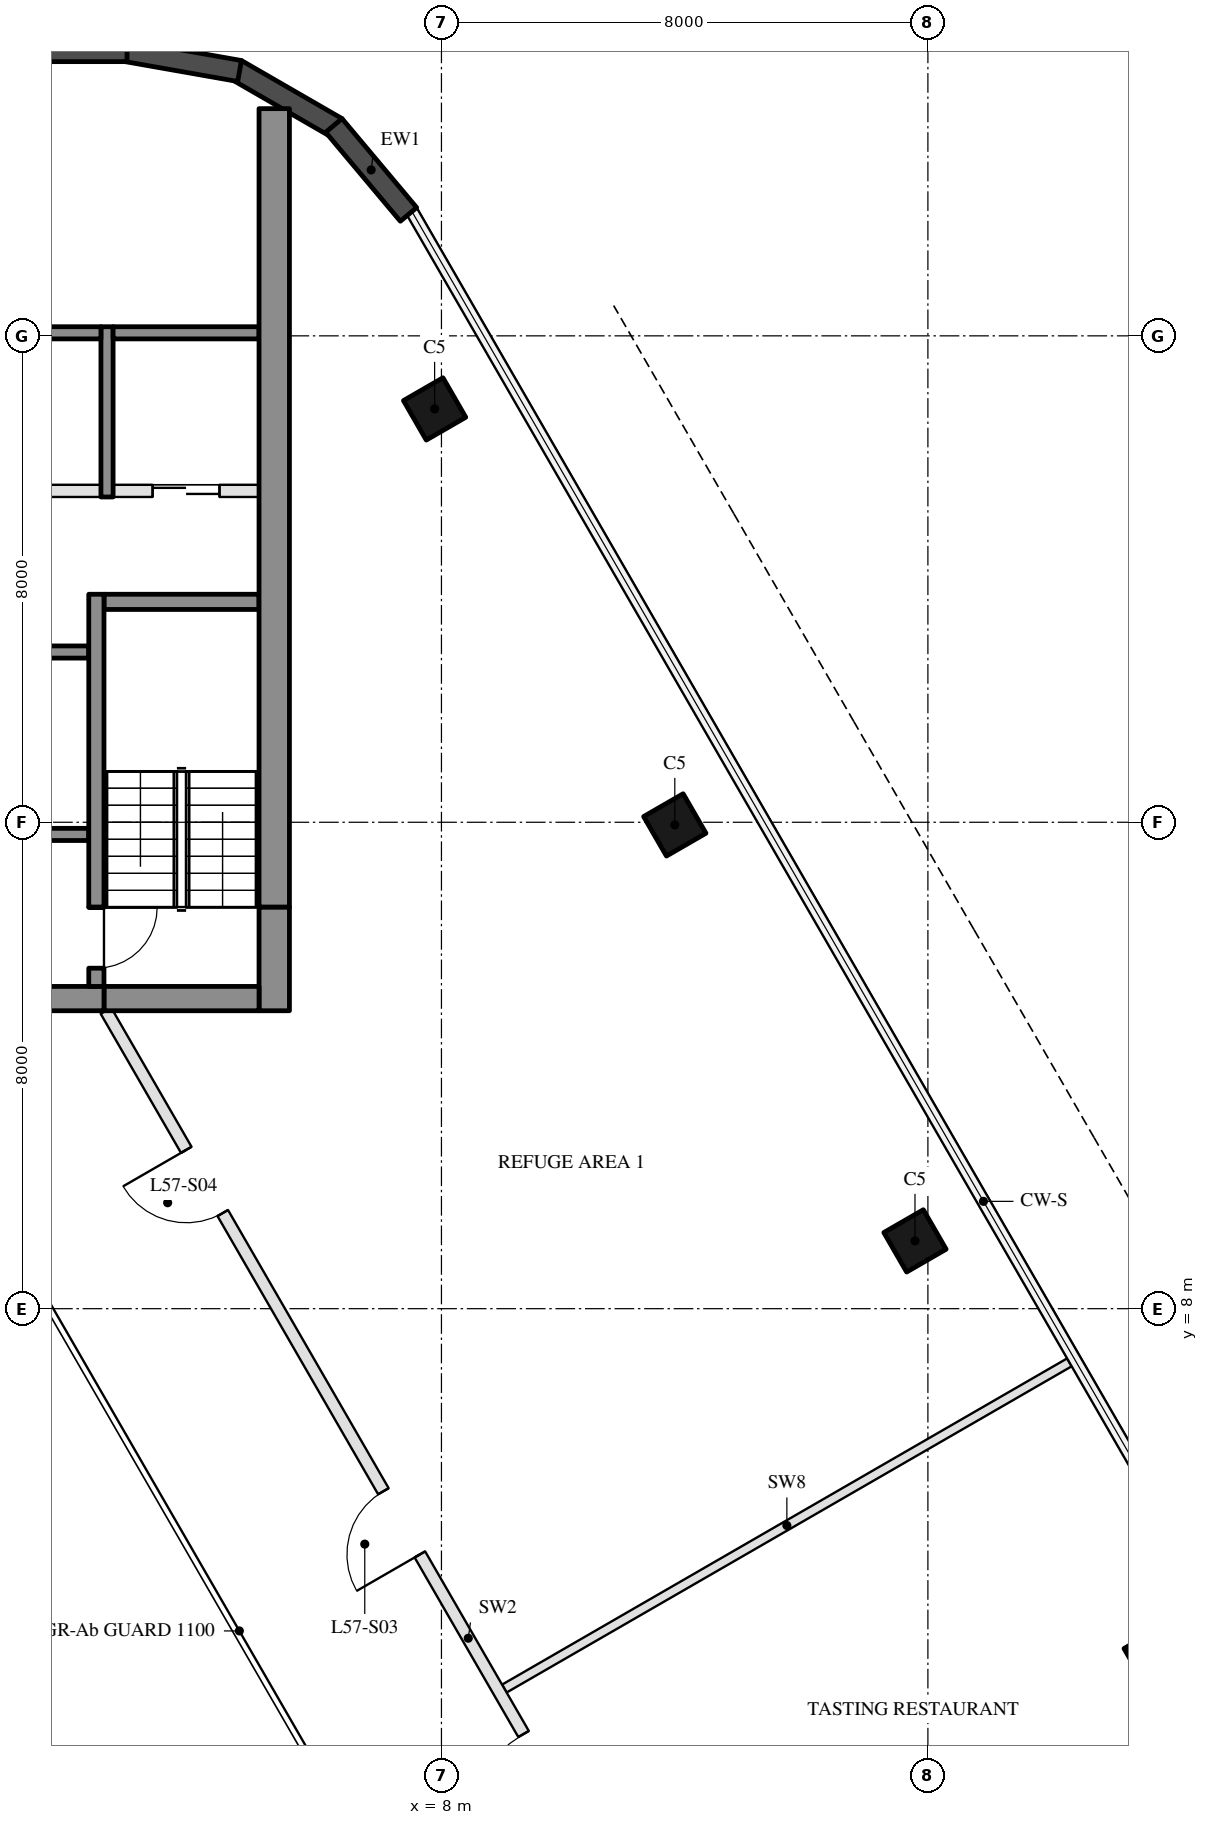
"""IFC4 building model, lengths in metres.
Left out: names, types, materials, properties, quantities, classifications, styles, units other than length and angle.
Written with IfcOpenShell. Run it as: python <this file> out.ifc"""

import sys

from ifc_helpers import new_model, si_unit, direction, frame, frame_2d, origin, origin_2d, place, context, subcontext, project, spatial, rectangle, hollow_rectangle, extrude, element, fill, save


model = new_model("IFC4")
c1 = context("Model", 3, precision=1e-05, world=origin(), true_north=direction((0.0, 1.0)))
c2 = subcontext(c1, "Body", "Model", "MODEL_VIEW")
j1 = project(units=[si_unit("LENGTHUNIT", "METRE"), si_unit("PLANEANGLEUNIT", "RADIAN")], contexts=[c1])
p1 = place(None, origin())
s1 = spatial("IfcSite", under=j1, at=p1, CompositionType="ELEMENT")
p2 = place(p1, origin())
s2 = spatial("IfcBuilding", under=s1, at=p2, CompositionType="ELEMENT")
p3 = place(p2, frame((0.0, 0.0, 231.7)))
s3 = spatial("IfcBuildingStorey", under=s2, at=p3, CompositionType="ELEMENT", Elevation=231.7)
for number, where, z_axis, x_axis in (
    (1, (19.738, 2.273, 0.0), (0.0, 0.0, 1.0), (-0.5, 0.866, 0.0)),
    (2, (15.788, 9.115, 0.0), (0.0, 0.0, 1.0), (-0.5, 0.866, 0.0)),
    (3, (11.838, 15.957, 0.0), (0.0, 0.0, 1.0), (-0.5, 0.866, 0.0)),
    (4, (7.888, 22.798, 0.0), (0.0, 0.0, 1.0), (-0.5, 0.866, 0.0)),
):
    element("IfcColumn", number, at=place(p3, frame(where, z_axis=z_axis, x_axis=x_axis)), inside=s3, PredefinedType="COLUMN", context=c2, shape_type="SweptSolid", body=[
        extrude(hollow_rectangle(XDim=0.75, YDim=0.75, WallThickness=0.035, at=origin_2d()), origin(), (0.0, 0.0, 1.0), 6.0),
    ])
for number, where, z_axis, x_axis in (
    (5, (6.277, 27.422, 0.0), (0.0, 0.0, 1.0), (-0.866, 0.5, 0.0)),
    (6, (4.68, 28.356, 0.0), (0.0, 0.0, 1.0), (-0.985, 0.174, 0.0)),
):
    element("IfcWall", number, at=place(p3, frame(where, z_axis=z_axis, x_axis=x_axis)), inside=s3, PredefinedType="SOLIDWALL", context=c2, shape_type="SweptSolid", body=[
        extrude(rectangle(XDim=1.91, YDim=0.35, at=frame_2d((0.955, 0.0))), origin(), (0.0, 0.0, 1.0), 5.7),
    ])
p4 = place(p3, frame((2.829, 28.685, 0.0), z_axis=(0.0, 0.0, 1.0), x_axis=(-1.0, 0.0, 0.0)))
e7 = element("IfcWall", 7, at=p4, inside=s3, PredefinedType="SOLIDWALL", context=c2, shape_type="SweptSolid", body=[
    extrude(rectangle(XDim=5.658, YDim=0.35, at=frame_2d((2.829, 0.0))), origin(), (0.0, 0.0, 1.0), 5.7),
])
p5 = place(p3, frame((7.458, 25.998, 0.0), z_axis=(0.0, 0.0, 1.0), x_axis=(-0.642808304945, 0.766027077259, 0.0)))
e8 = element("IfcWall", 8, at=p5, inside=s3, PredefinedType="SOLIDWALL", context=c2, shape_type="SweptSolid", body=[
    extrude(rectangle(XDim=1.91, YDim=0.35, at=frame_2d((0.955, 0.0))), origin(), (0.0, 0.0, 1.0), 5.7),
])
p6 = place(p3, frame((5.0, 19.625, 0.0), z_axis=(0.0, 0.0, 1.0), x_axis=(-1.0, 0.0, 0.0)))
e9 = element("IfcWall", 9, at=p6, inside=s3, PredefinedType="SHEAR", context=c2, shape_type="SweptSolid", body=[
    extrude(rectangle(XDim=2.55, YDim=0.25, at=frame_2d((1.275, 0.0))), origin(), (0.0, 0.0, 1.0), 5.7),
])
p7 = place(p3, frame((2.2, 18.8, 0.0), z_axis=(0.0, 0.0, 1.0), x_axis=(-1.0, 0.0, 0.0)))
e10 = element("IfcWall", 10, at=p7, inside=s3, PredefinedType="SHEAR", context=c2, shape_type="SweptSolid", body=[
    extrude(rectangle(XDim=2.8, YDim=0.2, at=frame_2d((1.4, 0.0))), origin(), (0.0, 0.0, 1.0), 5.7),
])
p8 = place(p3, frame((2.2, 15.8, 0.0), z_axis=(0.0, 0.0, 1.0), x_axis=(-1.0, 0.0, 0.0)))
e11 = element("IfcWall", 11, at=p8, inside=s3, PredefinedType="SHEAR", context=c2, shape_type="SweptSolid", body=[
    extrude(rectangle(XDim=2.8, YDim=0.2, at=frame_2d((1.4, 0.0))), origin(), (0.0, 0.0, 1.0), 5.7),
])
p9 = place(p8, frame((0.7, 0.0, 0.0)))
e12 = element("IfcOpeningElement", 12, at=p9, cuts=e11, PredefinedType="OPENING", context=c2, shape_type="SweptSolid", body=[
    extrude(rectangle(XDim=1.2, YDim=2.1, at=frame_2d((0.6, 1.05))), frame((0.0, 0.11, 0.0), z_axis=(0.0, -1.0, 0.0), x_axis=(1.0, 0.0, 0.0)), (0.0, 0.0, 1.0), 0.22),
])
p10 = place(p3, frame((2.5, 21.35, 0.0), z_axis=(0.0, 0.0, 1.0), x_axis=(0.0, 1.0, 0.0)))
e13 = element("IfcWall", 13, at=p10, inside=s3, PredefinedType="SHEAR", context=c2, shape_type="SweptSolid", body=[
    extrude(rectangle(XDim=2.8, YDim=0.2, at=frame_2d((1.4, 0.0))), origin(), (0.0, 0.0, 1.0), 5.7),
])
p11 = place(p3, frame((5.0, 24.05, 0.0), z_axis=(0.0, 0.0, 1.0), x_axis=(-1.0, 0.0, 0.0)))
e14 = element("IfcWall", 14, at=p11, inside=s3, PredefinedType="SHEAR", context=c2, shape_type="SweptSolid", body=[
    extrude(rectangle(XDim=2.4, YDim=0.2, at=frame_2d((1.2, 0.0))), origin(), (0.0, 0.0, 1.0), 5.7),
])
p12 = place(p3, frame((2.4, 24.05, 0.0), z_axis=(0.0, 0.0, 1.0), x_axis=(-1.0, 0.0, 0.0)))
e15 = element("IfcWall", 15, at=p12, inside=s3, PredefinedType="SHEAR", context=c2, shape_type="SweptSolid", body=[
    extrude(rectangle(XDim=2.8, YDim=0.2, at=frame_2d((1.4, 0.0))), origin(), (0.0, 0.0, 1.0), 5.7),
])
p13 = place(p3, frame((5.0, 21.45, 0.0), z_axis=(0.0, 0.0, 1.0), x_axis=(-1.0, 0.0, 0.0)))
e16 = element("IfcWall", 16, at=p13, inside=s3, PredefinedType="PARTITIONING", context=c2, shape_type="SweptSolid", body=[
    extrude(rectangle(XDim=2.4, YDim=0.2, at=frame_2d((1.2, 0.0))), origin(), (0.0, 0.0, 1.0), 5.7),
])
p14 = place(p13, frame((0.65, 0.0, 0.0)))
e17 = element("IfcOpeningElement", 17, at=p14, cuts=e16, PredefinedType="OPENING", context=c2, shape_type="SweptSolid", body=[
    extrude(rectangle(XDim=1.1, YDim=2.1, at=frame_2d((0.55, 1.05))), frame((0.0, 0.11, 0.0), z_axis=(0.0, -1.0, 0.0), x_axis=(1.0, 0.0, 0.0)), (0.0, 0.0, 1.0), 0.22),
])
p15 = place(p3, frame((2.4, 21.45, 0.0), z_axis=(0.0, 0.0, 1.0), x_axis=(-1.0, 0.0, 0.0)))
e18 = element("IfcWall", 18, at=p15, inside=s3, PredefinedType="PARTITIONING", context=c2, shape_type="SweptSolid", body=[
    extrude(rectangle(XDim=2.8, YDim=0.2, at=frame_2d((1.4, 0.0))), origin(), (0.0, 0.0, 1.0), 5.7),
])
p16 = place(p15, frame((0.85, 0.0, 0.0)))
e19 = element("IfcOpeningElement", 19, at=p16, cuts=e18, PredefinedType="OPENING", context=c2, shape_type="SweptSolid", body=[
    extrude(rectangle(XDim=1.1, YDim=2.1, at=frame_2d((0.55, 1.05))), frame((0.0, 0.11, 0.0), z_axis=(0.0, -1.0, 0.0), x_axis=(1.0, 0.0, 0.0)), (0.0, 0.0, 1.0), 0.22),
])
p17 = place(p3, frame((5.25, 12.9, 0.0), z_axis=(0.0, 0.0, 1.0), x_axis=(0.0, 1.0, 0.0)))
e20 = element("IfcWall", 20, at=p17, inside=s3, PredefinedType="SHEAR", context=c2, shape_type="SweptSolid", body=[
    extrude(rectangle(XDim=1.706, YDim=0.5, at=frame_2d((0.853, 0.0))), origin(), (0.0, 0.0, 1.0), 5.7),
])
p18 = place(p3, frame((5.25, 14.606, 0.0), z_axis=(0.0, 0.0, 1.0), x_axis=(0.0, 1.0, 0.0)))
e21 = element("IfcWall", 21, at=p18, inside=s3, PredefinedType="SHEAR", context=c2, shape_type="SweptSolid", body=[
    extrude(rectangle(XDim=13.131, YDim=0.5, at=frame_2d((6.565, 0.0))), origin(), (0.0, 0.0, 1.0), 5.7),
])
p19 = place(p3, frame((5.0, 13.1, 0.0), z_axis=(0.0, 0.0, 1.0), x_axis=(-1.0, 0.0, 0.0)))
e22 = element("IfcWall", 22, at=p19, inside=s3, PredefinedType="SHEAR", context=c2, shape_type="SweptSolid", body=[
    extrude(rectangle(XDim=2.55, YDim=0.4, at=frame_2d((1.275, 0.0))), origin(), (0.0, 0.0, 1.0), 5.7),
])
p20 = place(p3, frame((2.45, 13.1, 0.0), z_axis=(0.0, 0.0, 1.0), x_axis=(-1.0, 0.0, 0.0)))
e23 = element("IfcWall", 23, at=p20, inside=s3, PredefinedType="SHEAR", context=c2, shape_type="SweptSolid", body=[
    extrude(rectangle(XDim=7.45, YDim=0.4, at=frame_2d((3.725, 0.0))), origin(), (0.0, 0.0, 1.0), 5.7),
])
p21 = place(p20, frame((1.0, 0.0, 0.0)))
e24 = element("IfcOpeningElement", 24, at=p21, cuts=e23, PredefinedType="OPENING", context=c2, shape_type="SweptSolid", body=[
    extrude(rectangle(XDim=1.1, YDim=2.1, at=frame_2d((0.55, 1.05))), frame((0.0, 0.21, 0.0), z_axis=(0.0, -1.0, 0.0), x_axis=(1.0, 0.0, 0.0)), (0.0, 0.0, 1.0), 0.42),
])
p22 = place(p20, frame((3.3, 0.0, 0.0)))
e25 = element("IfcOpeningElement", 25, at=p22, cuts=e23, PredefinedType="OPENING", context=c2, shape_type="SweptSolid", body=[
    extrude(rectangle(XDim=1.4, YDim=2.1, at=frame_2d((0.7, 1.05))), frame((0.0, 0.21, 0.0), z_axis=(0.0, -1.0, 0.0), x_axis=(1.0, 0.0, 0.0)), (0.0, 0.0, 1.0), 0.42),
])
p23 = place(p3, frame((2.325, 13.3, 0.0), z_axis=(0.0, 0.0, 1.0), x_axis=(0.0, 1.0, 0.0)))
e26 = element("IfcWall", 26, at=p23, inside=s3, PredefinedType="SHEAR", context=c2, shape_type="SweptSolid", body=[
    extrude(rectangle(XDim=1.306, YDim=0.25, at=frame_2d((0.653, 0.0))), origin(), (0.0, 0.0, 1.0), 5.7),
])
p24 = place(p23, frame((0.3, 0.0, 0.0)))
e27 = element("IfcOpeningElement", 27, at=p24, cuts=e26, PredefinedType="OPENING", context=c2, shape_type="SweptSolid", body=[
    extrude(rectangle(XDim=1.0, YDim=2.1, at=frame_2d((0.5, 1.05))), frame((0.0, 0.135, 0.0), z_axis=(0.0, -1.0, 0.0), x_axis=(1.0, 0.0, 0.0)), (0.0, 0.0, 1.0), 0.27),
])
p25 = place(p3, frame((2.325, 14.606, 0.0), z_axis=(0.0, 0.0, 1.0), x_axis=(0.0, 1.0, 0.0)))
e28 = element("IfcWall", 28, at=p25, inside=s3, PredefinedType="SHEAR", context=c2, shape_type="SweptSolid", body=[
    extrude(rectangle(XDim=5.144, YDim=0.25, at=frame_2d((2.572, 0.0))), origin(), (0.0, 0.0, 1.0), 5.7),
])
p26 = place(p3, frame((18.327, 7.117, 0.0), z_axis=(0.0, 0.0, 1.0), x_axis=(-0.866026447599, -0.499998192055, 0.0)))
e29 = element("IfcWall", 29, at=p26, inside=s3, PredefinedType="PARTITIONING", context=c2, shape_type="SweptSolid", body=[
    extrude(rectangle(XDim=10.73, YDim=0.15, at=frame_2d((5.365, 0.0))), origin(), (0.0, 0.0, 1.0), 5.7),
])
p27 = place(p3, frame((12.413, -4.3, 0.0), z_axis=(0.0, 0.0, 1.0), x_axis=(-0.50000478328, 0.866022642139, 0.0)))
e30 = element("IfcWall", 30, at=p27, inside=s3, PredefinedType="PARTITIONING", context=c2, shape_type="SweptSolid", body=[
    extrude(rectangle(XDim=19.861, YDim=0.2, at=frame_2d((9.931, 0.0))), origin(), (0.0, 0.0, 1.0), 4.91),
])
p28 = place(p27, frame((1.142, 0.0, 0.0)))
e31 = element("IfcOpeningElement", 31, at=p28, cuts=e30, PredefinedType="OPENING", context=c2, shape_type="SweptSolid", body=[
    extrude(rectangle(XDim=1.8, YDim=2.4, at=frame_2d((0.9, 1.2))), frame((0.0, 0.11, 0.0), z_axis=(0.0, -1.0, 0.0), x_axis=(1.0, 0.0, 0.0)), (0.0, 0.0, 1.0), 0.22),
])
p29 = place(p27, frame((4.325, 0.0, 0.0)))
e32 = element("IfcOpeningElement", 32, at=p29, cuts=e30, PredefinedType="OPENING", context=c2, shape_type="SweptSolid", body=[
    extrude(rectangle(XDim=1.8, YDim=2.4, at=frame_2d((0.9, 1.2))), frame((0.0, 0.11, 0.0), z_axis=(0.0, -1.0, 0.0), x_axis=(1.0, 0.0, 0.0)), (0.0, 0.0, 1.0), 0.22),
])
p30 = place(p27, frame((9.536, 0.0, 0.0)))
e33 = element("IfcOpeningElement", 33, at=p30, cuts=e30, PredefinedType="OPENING", context=c2, shape_type="SweptSolid", body=[
    extrude(rectangle(XDim=1.2, YDim=2.1, at=frame_2d((0.6, 1.05))), frame((0.0, 0.11, 0.0), z_axis=(0.0, -1.0, 0.0), x_axis=(1.0, 0.0, 0.0)), (0.0, 0.0, 1.0), 0.22),
])
p31 = place(p27, frame((16.019, 0.0, 0.0)))
e34 = element("IfcOpeningElement", 34, at=p31, cuts=e30, PredefinedType="OPENING", context=c2, shape_type="SweptSolid", body=[
    extrude(rectangle(XDim=1.2, YDim=2.1, at=frame_2d((0.6, 1.05))), frame((0.0, 0.11, 0.0), z_axis=(0.0, -1.0, 0.0), x_axis=(1.0, 0.0, 0.0)), (0.0, 0.0, 1.0), 0.22),
])
p32 = place(p14, origin())
e35 = element("IfcDoor", 35, at=p32, inside=s3, OperationType="DOUBLE_DOOR_SLIDING", PredefinedType="DOOR", context=c2, shape_type="SweptSolid", body=[
    extrude(rectangle(XDim=1.1, YDim=2.1, at=frame_2d((0.55, 1.05))), frame((0.0, 0.025, 0.0), z_axis=(0.0, -1.0, 0.0), x_axis=(1.0, 0.0, 0.0)), (0.0, 0.0, 1.0), 0.05),
])
fill(e17, e35)
p33 = place(p24, frame((1.0, 0.0, 0.0), z_axis=(0.0, 0.0, 1.0), x_axis=(-1.0, 0.0, 0.0)))
e36 = element("IfcDoor", 36, at=p33, inside=s3, OperationType="SINGLE_SWING_LEFT", PredefinedType="DOOR", context=c2, shape_type="SweptSolid", body=[
    extrude(rectangle(XDim=1.0, YDim=2.1, at=frame_2d((0.5, 1.05))), frame((0.0, 0.025, 0.0), z_axis=(0.0, -1.0, 0.0), x_axis=(1.0, 0.0, 0.0)), (0.0, 0.0, 1.0), 0.05),
])
fill(e27, e36)
p34 = place(p29, origin())
e37 = element("IfcDoor", 37, at=p34, inside=s3, OperationType="DOUBLE_DOOR_SINGLE_SWING", PredefinedType="DOOR", context=c2, shape_type="SweptSolid", body=[
    extrude(rectangle(XDim=1.8, YDim=2.4, at=frame_2d((0.9, 1.2))), frame((0.0, 0.025, 0.0), z_axis=(0.0, -1.0, 0.0), x_axis=(1.0, 0.0, 0.0)), (0.0, 0.0, 1.0), 0.05),
])
fill(e32, e37)
p35 = place(p30, origin())
e38 = element("IfcDoor", 38, at=p35, inside=s3, OperationType="SINGLE_SWING_LEFT", PredefinedType="DOOR", context=c2, shape_type="SweptSolid", body=[
    extrude(rectangle(XDim=1.2, YDim=2.1, at=frame_2d((0.6, 1.05))), frame((0.0, 0.025, 0.0), z_axis=(0.0, -1.0, 0.0), x_axis=(1.0, 0.0, 0.0)), (0.0, 0.0, 1.0), 0.05),
])
fill(e33, e38)
p36 = place(p31, origin())
e39 = element("IfcDoor", 39, at=p36, inside=s3, OperationType="SINGLE_SWING_RIGHT", PredefinedType="DOOR", context=c2, shape_type="SweptSolid", body=[
    extrude(rectangle(XDim=1.2, YDim=2.1, at=frame_2d((0.6, 1.05))), frame((0.0, 0.025, 0.0), z_axis=(0.0, -1.0, 0.0), x_axis=(1.0, 0.0, 0.0)), (0.0, 0.0, 1.0), 0.05),
])
fill(e34, e39)
save(model, sys.argv[1])
